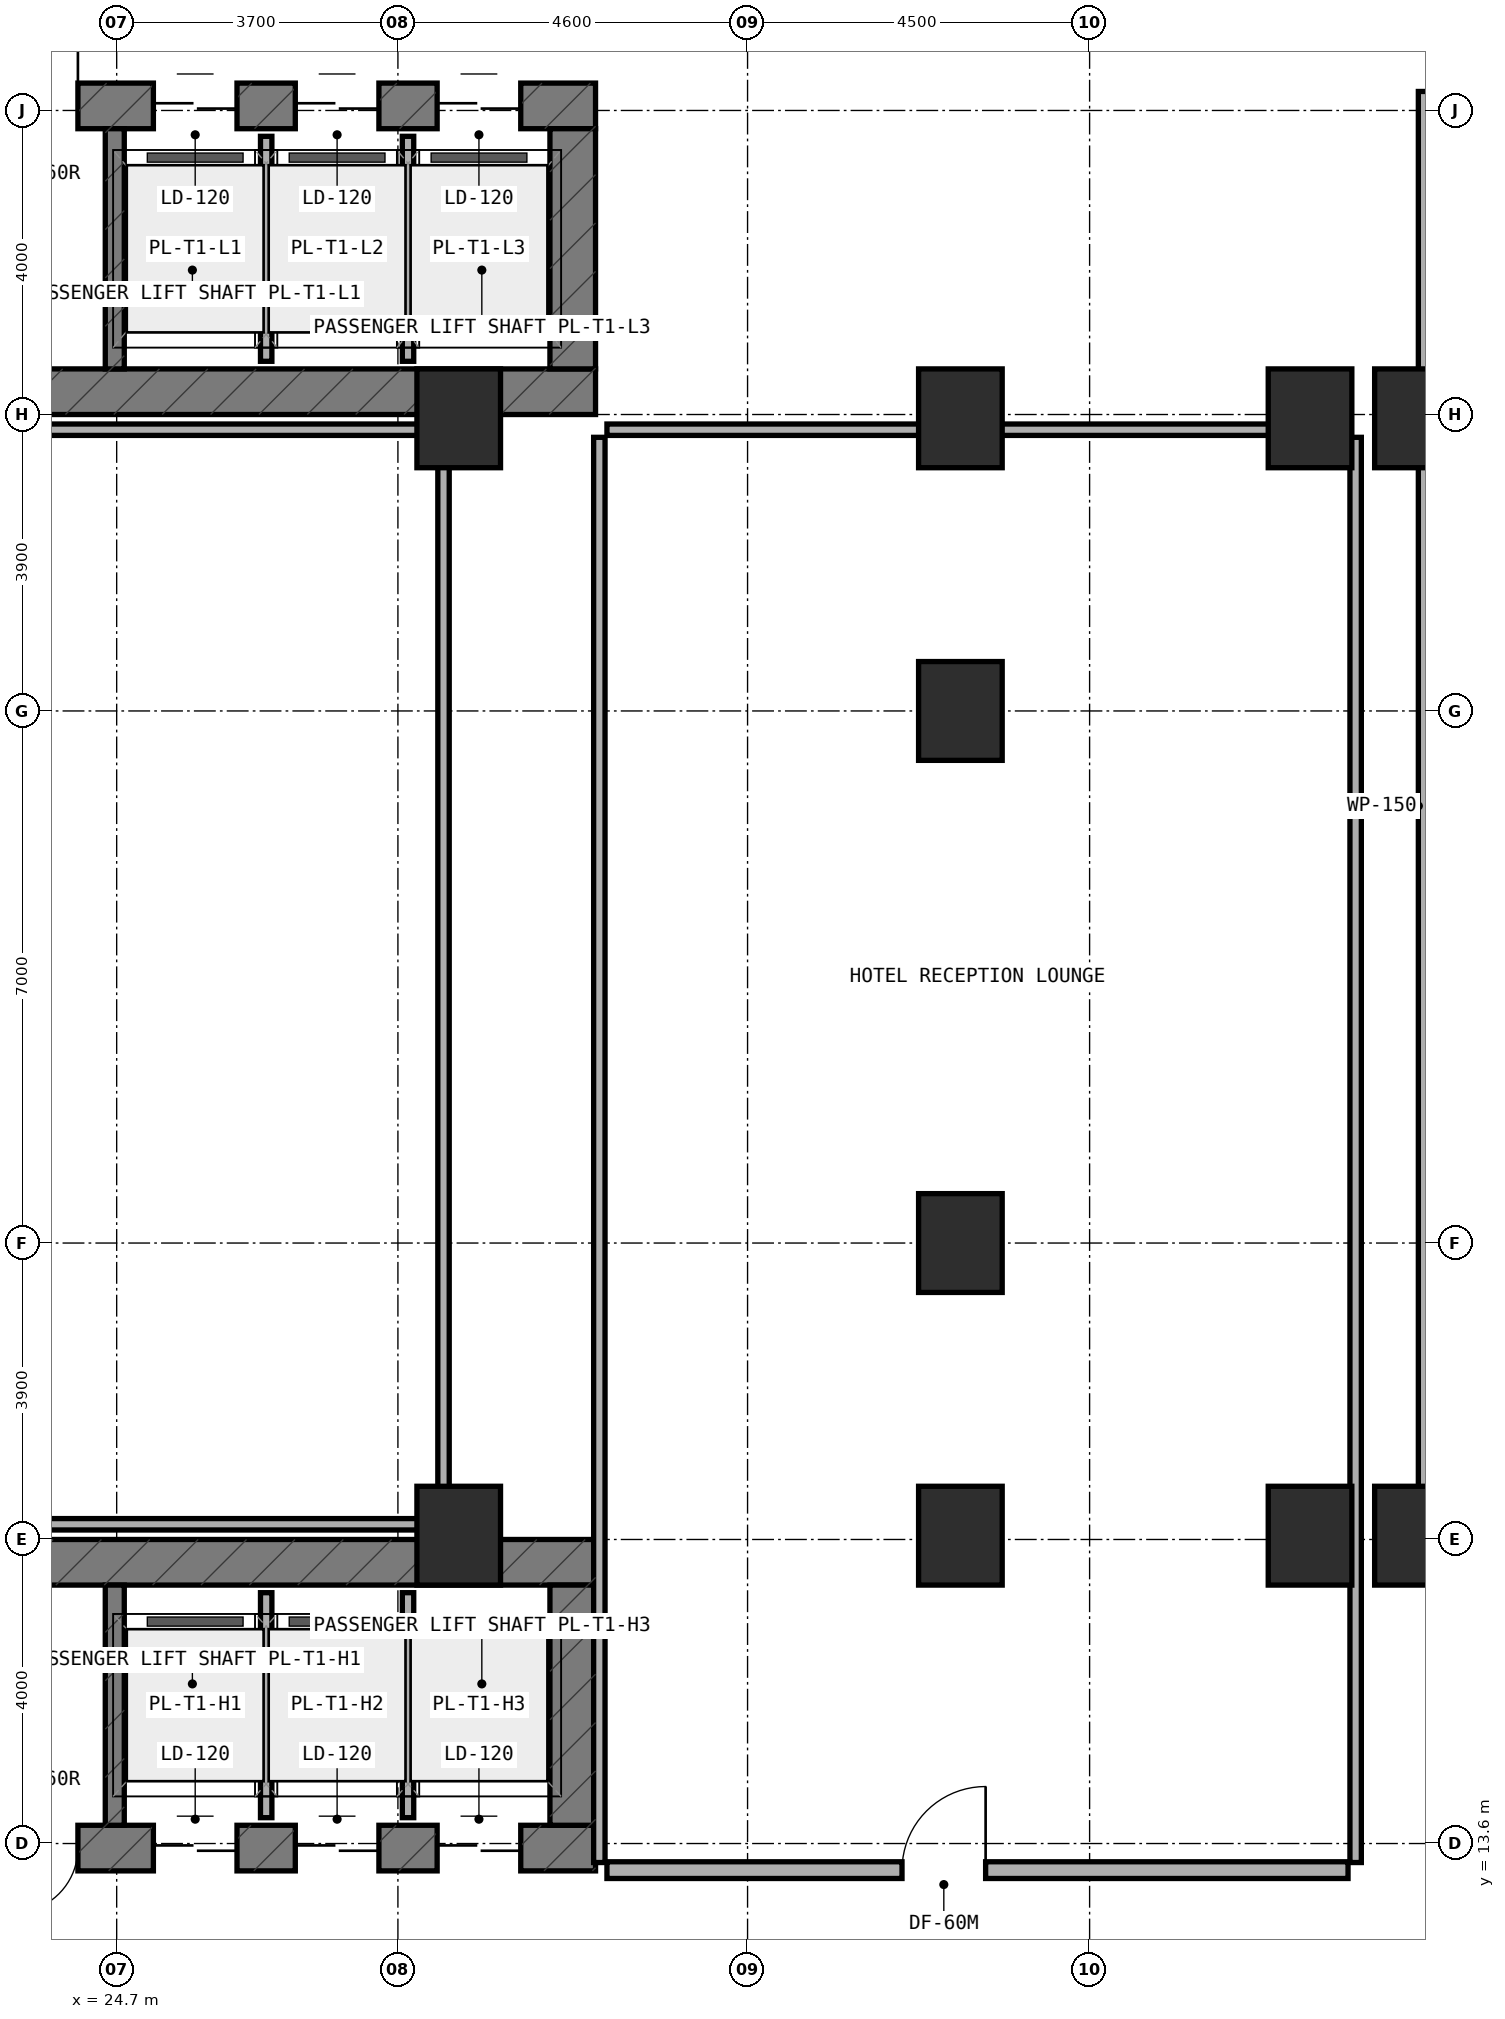
"""IFC4 building model, lengths in metres.
Left out: names, types, materials, properties, quantities, classifications, styles, units other than length and angle.
Written with IfcOpenShell. Run it as: python <this file> out.ifc"""

import sys

from ifc_helpers import new_model, si_unit, direction, frame, frame_2d, origin, origin_2d, place, context, subcontext, project, spatial, rectangle, extrude, element, fill, save


model = new_model("IFC4")
c1 = context("Model", 3, precision=1e-05, world=origin(), true_north=direction((0.0, 1.0)))
c2 = subcontext(c1, "Body", "Model", "MODEL_VIEW")
j1 = project(units=[si_unit("LENGTHUNIT", "METRE"), si_unit("PLANEANGLEUNIT", "RADIAN")], contexts=[c1])
p1 = place(None, origin())
s1 = spatial("IfcSite", under=j1, at=p1, CompositionType="ELEMENT")
p2 = place(p1, origin())
s2 = spatial("IfcBuilding", under=s1, at=p2, CompositionType="ELEMENT")
p3 = place(p2, origin())
s3 = spatial("IfcBuildingStorey", under=s2, at=p3, CompositionType="ELEMENT", Elevation=0.0)
p4 = place(p3, frame((6.2, 32.7, 0.0), z_axis=(0.0, 0.0, 1.0), x_axis=(1.0, 0.0, 0.0)))
e1 = element("IfcWall", 1, at=p4, inside=s3, PredefinedType="SHEAR", context=c2, shape_type="SweptSolid", body=[
    extrude(rectangle(XDim=24.8, YDim=0.6, at=frame_2d((12.4, 0.0))), origin(), (0.0, 0.0, 1.0), 5.4),
])
p5 = place(p3, frame((6.2, 36.46, 0.0), z_axis=(0.0, 0.0, 1.0), x_axis=(1.0, 0.0, 0.0)))
e2 = element("IfcWall", 2, at=p5, inside=s3, PredefinedType="SHEAR", context=c2, shape_type="SweptSolid", body=[
    extrude(rectangle(XDim=24.8, YDim=0.6, at=frame_2d((12.4, 0.0))), origin(), (0.0, 0.0, 1.0), 5.4),
])
p6 = place(p5, frame((9.35, 0.0, 0.0)))
e3 = element("IfcOpeningElement", 3, at=p6, cuts=e2, PredefinedType="OPENING", context=c2, shape_type="SweptSolid", body=[
    extrude(rectangle(XDim=1.2, YDim=2.15, at=frame_2d((0.6, 1.075))), frame((0.0, 0.31, 0.0), z_axis=(0.0, -1.0, 0.0), x_axis=(1.0, 0.0, 0.0)), (0.0, 0.0, 1.0), 0.62),
])
p7 = place(p5, frame((6.15, 0.0, 0.0)))
e4 = element("IfcOpeningElement", 4, at=p7, cuts=e2, PredefinedType="OPENING", context=c2, shape_type="SweptSolid", body=[
    extrude(rectangle(XDim=1.3, YDim=2.15, at=frame_2d((0.65, 1.075))), frame((0.0, 0.31, 0.0), z_axis=(0.0, -1.0, 0.0), x_axis=(1.0, 0.0, 0.0)), (0.0, 0.0, 1.0), 0.62),
])
p8 = place(p5, frame((17.14, 0.0, 0.0)))
e5 = element("IfcOpeningElement", 5, at=p8, cuts=e2, PredefinedType="OPENING", context=c2, shape_type="SweptSolid", body=[
    extrude(rectangle(XDim=0.85, YDim=2.1, at=frame_2d((0.425, 1.05))), frame((0.0, 0.31, 0.0), z_axis=(0.0, -1.0, 0.0), x_axis=(1.0, 0.0, 0.0)), (0.0, 0.0, 1.0), 0.62),
])
p9 = place(p5, frame((18.983, 0.0, 0.0)))
e6 = element("IfcOpeningElement", 6, at=p9, cuts=e2, PredefinedType="OPENING", context=c2, shape_type="SweptSolid", body=[
    extrude(rectangle(XDim=1.1, YDim=2.15, at=frame_2d((0.55, 1.075))), frame((0.0, 0.31, 0.0), z_axis=(0.0, -1.0, 0.0), x_axis=(1.0, 0.0, 0.0)), (0.0, 0.0, 1.0), 0.62),
])
p10 = place(p5, frame((20.85, 0.0, 0.0)))
e7 = element("IfcOpeningElement", 7, at=p10, cuts=e2, PredefinedType="OPENING", context=c2, shape_type="SweptSolid", body=[
    extrude(rectangle(XDim=1.1, YDim=2.15, at=frame_2d((0.55, 1.075))), frame((0.0, 0.31, 0.0), z_axis=(0.0, -1.0, 0.0), x_axis=(1.0, 0.0, 0.0)), (0.0, 0.0, 1.0), 0.62),
])
p11 = place(p5, frame((22.716, 0.0, 0.0)))
e8 = element("IfcOpeningElement", 8, at=p11, cuts=e2, PredefinedType="OPENING", context=c2, shape_type="SweptSolid", body=[
    extrude(rectangle(XDim=1.1, YDim=2.15, at=frame_2d((0.55, 1.075))), frame((0.0, 0.31, 0.0), z_axis=(0.0, -1.0, 0.0), x_axis=(1.0, 0.0, 0.0)), (0.0, 0.0, 1.0), 0.62),
])
p12 = place(p3, frame((30.7, 33.0, 0.0), z_axis=(0.0, 0.0, 1.0), x_axis=(0.0, 1.0, 0.0)))
e9 = element("IfcWall", 9, at=p12, inside=s3, PredefinedType="SHEAR", context=c2, shape_type="SweptSolid", body=[
    extrude(rectangle(XDim=3.16, YDim=0.6, at=frame_2d((1.58, 0.0))), origin(), (0.0, 0.0, 1.0), 5.4),
])
p13 = place(p3, frame((24.675, 33.0, 0.0), z_axis=(0.0, 0.0, 1.0), x_axis=(0.0, 1.0, 0.0)))
e10 = element("IfcWall", 10, at=p13, inside=s3, PredefinedType="STANDARD", context=c2, shape_type="SweptSolid", body=[
    extrude(rectangle(XDim=3.16, YDim=0.25, at=frame_2d((1.58, 0.0))), origin(), (0.0, 0.0, 1.0), 5.05),
])
p14 = place(p3, frame((6.2, 13.54, 0.0), z_axis=(0.0, 0.0, 1.0), x_axis=(1.0, 0.0, 0.0)))
e11 = element("IfcWall", 11, at=p14, inside=s3, PredefinedType="SHEAR", context=c2, shape_type="SweptSolid", body=[
    extrude(rectangle(XDim=24.8, YDim=0.6, at=frame_2d((12.4, 0.0))), origin(), (0.0, 0.0, 1.0), 5.4),
])
p15 = place(p14, frame((9.35, 0.0, 0.0)))
e12 = element("IfcOpeningElement", 12, at=p15, cuts=e11, PredefinedType="OPENING", context=c2, shape_type="SweptSolid", body=[
    extrude(rectangle(XDim=1.2, YDim=2.15, at=frame_2d((0.6, 1.075))), frame((0.0, 0.31, 0.0), z_axis=(0.0, -1.0, 0.0), x_axis=(1.0, 0.0, 0.0)), (0.0, 0.0, 1.0), 0.62),
])
p16 = place(p14, frame((6.15, 0.0, 0.0)))
e13 = element("IfcOpeningElement", 13, at=p16, cuts=e11, PredefinedType="OPENING", context=c2, shape_type="SweptSolid", body=[
    extrude(rectangle(XDim=1.3, YDim=2.15, at=frame_2d((0.65, 1.075))), frame((0.0, 0.31, 0.0), z_axis=(0.0, -1.0, 0.0), x_axis=(1.0, 0.0, 0.0)), (0.0, 0.0, 1.0), 0.62),
])
p17 = place(p14, frame((17.14, 0.0, 0.0)))
e14 = element("IfcOpeningElement", 14, at=p17, cuts=e11, PredefinedType="OPENING", context=c2, shape_type="SweptSolid", body=[
    extrude(rectangle(XDim=0.85, YDim=2.1, at=frame_2d((0.425, 1.05))), frame((0.0, 0.31, 0.0), z_axis=(0.0, -1.0, 0.0), x_axis=(1.0, 0.0, 0.0)), (0.0, 0.0, 1.0), 0.62),
])
p18 = place(p14, frame((18.983, 0.0, 0.0)))
e15 = element("IfcOpeningElement", 15, at=p18, cuts=e11, PredefinedType="OPENING", context=c2, shape_type="SweptSolid", body=[
    extrude(rectangle(XDim=1.1, YDim=2.15, at=frame_2d((0.55, 1.075))), frame((0.0, 0.31, 0.0), z_axis=(0.0, -1.0, 0.0), x_axis=(1.0, 0.0, 0.0)), (0.0, 0.0, 1.0), 0.62),
])
p19 = place(p14, frame((20.85, 0.0, 0.0)))
e16 = element("IfcOpeningElement", 16, at=p19, cuts=e11, PredefinedType="OPENING", context=c2, shape_type="SweptSolid", body=[
    extrude(rectangle(XDim=1.1, YDim=2.15, at=frame_2d((0.55, 1.075))), frame((0.0, 0.31, 0.0), z_axis=(0.0, -1.0, 0.0), x_axis=(1.0, 0.0, 0.0)), (0.0, 0.0, 1.0), 0.62),
])
p20 = place(p14, frame((22.716, 0.0, 0.0)))
e17 = element("IfcOpeningElement", 17, at=p20, cuts=e11, PredefinedType="OPENING", context=c2, shape_type="SweptSolid", body=[
    extrude(rectangle(XDim=1.1, YDim=2.15, at=frame_2d((0.55, 1.075))), frame((0.0, 0.31, 0.0), z_axis=(0.0, -1.0, 0.0), x_axis=(1.0, 0.0, 0.0)), (0.0, 0.0, 1.0), 0.62),
])
p21 = place(p3, frame((6.2, 17.3, 0.0), z_axis=(0.0, 0.0, 1.0), x_axis=(1.0, 0.0, 0.0)))
e18 = element("IfcWall", 18, at=p21, inside=s3, PredefinedType="SHEAR", context=c2, shape_type="SweptSolid", body=[
    extrude(rectangle(XDim=24.8, YDim=0.6, at=frame_2d((12.4, 0.0))), origin(), (0.0, 0.0, 1.0), 5.4),
])
p22 = place(p3, frame((30.7, 13.84, 0.0), z_axis=(0.0, 0.0, 1.0), x_axis=(0.0, 1.0, 0.0)))
e19 = element("IfcWall", 19, at=p22, inside=s3, PredefinedType="SHEAR", context=c2, shape_type="SweptSolid", body=[
    extrude(rectangle(XDim=3.16, YDim=0.6, at=frame_2d((1.58, 0.0))), origin(), (0.0, 0.0, 1.0), 5.4),
])
p23 = place(p3, frame((24.675, 13.84, 0.0), z_axis=(0.0, 0.0, 1.0), x_axis=(0.0, 1.0, 0.0)))
e20 = element("IfcWall", 20, at=p23, inside=s3, PredefinedType="STANDARD", context=c2, shape_type="SweptSolid", body=[
    extrude(rectangle(XDim=3.16, YDim=0.25, at=frame_2d((1.58, 0.0))), origin(), (0.0, 0.0, 1.0), 5.05),
])
for number, where, z_axis, x_axis in (
    (21, (35.8, 21.5, 0.0), (0.0, 0.0, 1.0), (1.0, 0.0, 0.0)),
    (22, (35.8, 28.5, 0.0), (0.0, 0.0, 1.0), (1.0, 0.0, 0.0)),
    (23, (35.8, 17.65, 0.0), (0.0, 0.0, 1.0), (1.0, 0.0, 0.0)),
    (24, (35.8, 32.35, 0.0), (0.0, 0.0, 1.0), (1.0, 0.0, 0.0)),
    (25, (29.2, 17.65, 0.0), (0.0, 0.0, 1.0), (1.0, 0.0, 0.0)),
    (26, (29.2, 32.35, 0.0), (0.0, 0.0, 1.0), (1.0, 0.0, 0.0)),
    (27, (40.4, 17.65, 0.0), (0.0, 0.0, 1.0), (1.0, 0.0, 0.0)),
    (28, (40.4, 32.35, 0.0), (0.0, 0.0, 1.0), (1.0, 0.0, 0.0)),
    (29, (41.8, 17.65, 0.0), (0.0, 0.0, 1.0), (1.0, 0.0, 0.0)),
    (30, (41.8, 32.35, 0.0), (0.0, 0.0, 1.0), (1.0, 0.0, 0.0)),
):
    element("IfcColumn", number, at=place(p3, frame(where, z_axis=z_axis, x_axis=x_axis)), inside=s3, PredefinedType="COLUMN", context=c2, shape_type="SweptSolid", body=[
        extrude(rectangle(XDim=1.1, YDim=1.3, at=origin_2d()), origin(), (0.0, 0.0, 1.0), 5.4),
    ])
p24 = place(p3, frame((26.667, 33.1, 0.0), z_axis=(0.0, 0.0, 1.0), x_axis=(0.0, 1.0, 0.0)))
e31 = element("IfcWall", 31, at=p24, inside=s3, PredefinedType="PARTITIONING", context=c2, shape_type="SweptSolid", body=[
    extrude(rectangle(XDim=2.96, YDim=0.15, at=frame_2d((1.48, 0.0))), origin(), (0.0, 0.0, 1.0), 5.05),
])
p25 = place(p3, frame((28.533, 33.1, 0.0), z_axis=(0.0, 0.0, 1.0), x_axis=(0.0, 1.0, 0.0)))
e32 = element("IfcWall", 32, at=p25, inside=s3, PredefinedType="PARTITIONING", context=c2, shape_type="SweptSolid", body=[
    extrude(rectangle(XDim=2.96, YDim=0.15, at=frame_2d((1.48, 0.0))), origin(), (0.0, 0.0, 1.0), 4.125),
])
p26 = place(p3, frame((26.667, 13.94, 0.0), z_axis=(0.0, 0.0, 1.0), x_axis=(0.0, 1.0, 0.0)))
e33 = element("IfcWall", 33, at=p26, inside=s3, PredefinedType="PARTITIONING", context=c2, shape_type="SweptSolid", body=[
    extrude(rectangle(XDim=2.96, YDim=0.15, at=frame_2d((1.48, 0.0))), origin(), (0.0, 0.0, 1.0), 5.05),
])
p27 = place(p3, frame((28.533, 13.94, 0.0), z_axis=(0.0, 0.0, 1.0), x_axis=(0.0, 1.0, 0.0)))
e34 = element("IfcWall", 34, at=p27, inside=s3, PredefinedType="PARTITIONING", context=c2, shape_type="SweptSolid", body=[
    extrude(rectangle(XDim=2.96, YDim=0.15, at=frame_2d((1.48, 0.0))), origin(), (0.0, 0.0, 1.0), 4.125),
])
p28 = place(p3, frame((29.0, 17.9, 0.0), z_axis=(0.0, 0.0, 1.0), x_axis=(0.0, 1.0, 0.0)))
e35 = element("IfcWall", 35, at=p28, inside=s3, PredefinedType="PARTITIONING", context=c2, shape_type="SweptSolid", body=[
    extrude(rectangle(XDim=14.2, YDim=0.15, at=frame_2d((7.1, 0.0))), origin(), (0.0, 0.0, 1.0), 4.025),
])
for number, where, z_axis, x_axis in (
    (36, (11.9, 17.8, 0.0), (0.0, 0.0, 1.0), (1.0, 0.0, 0.0)),
    (37, (11.9, 32.2, 0.0), (0.0, 0.0, 1.0), (1.0, 0.0, 0.0)),
):
    element("IfcWall", number, at=place(p3, frame(where, z_axis=z_axis, x_axis=x_axis)), inside=s3, PredefinedType="PARTITIONING", context=c2, shape_type="SweptSolid", body=[
        extrude(rectangle(XDim=17.0, YDim=0.15, at=frame_2d((8.5, 0.0))), origin(), (0.0, 0.0, 1.0), 5.05),
    ])
p29 = place(p3, frame((31.05, 13.35, 0.0), z_axis=(0.0, 0.0, 1.0), x_axis=(0.0, 1.0, 0.0)))
e38 = element("IfcWall", 38, at=p29, inside=s3, PredefinedType="PARTITIONING", context=c2, shape_type="SweptSolid", body=[
    extrude(rectangle(XDim=18.75, YDim=0.15, at=frame_2d((9.375, 0.0))), origin(), (0.0, 0.0, 1.0), 4.025),
])
p30 = place(p3, frame((41.0, 13.35, 0.0), z_axis=(0.0, 0.0, 1.0), x_axis=(0.0, 1.0, 0.0)))
e39 = element("IfcWall", 39, at=p30, inside=s3, PredefinedType="PARTITIONING", context=c2, shape_type="SweptSolid", body=[
    extrude(rectangle(XDim=18.75, YDim=0.15, at=frame_2d((9.375, 0.0))), origin(), (0.0, 0.0, 1.0), 4.525),
])
p31 = place(p3, frame((31.15, 32.2, 0.0), z_axis=(0.0, 0.0, 1.0), x_axis=(1.0, 0.0, 0.0)))
e40 = element("IfcWall", 40, at=p31, inside=s3, PredefinedType="PARTITIONING", context=c2, shape_type="SweptSolid", body=[
    extrude(rectangle(XDim=9.75, YDim=0.15, at=frame_2d((4.875, 0.0))), origin(), (0.0, 0.0, 1.0), 4.125),
])
p32 = place(p3, frame((31.15, 13.25, 0.0), z_axis=(0.0, 0.0, 1.0), x_axis=(1.0, 0.0, 0.0)))
e41 = element("IfcWall", 41, at=p32, inside=s3, PredefinedType="SOLIDWALL", context=c2, shape_type="SweptSolid", body=[
    extrude(rectangle(XDim=9.75, YDim=0.22, at=frame_2d((4.875, 0.0))), origin(), (0.0, 0.0, 1.0), 4.575),
])
p33 = place(p32, frame((3.882, 0.0, 0.0)))
e42 = element("IfcOpeningElement", 42, at=p33, cuts=e41, PredefinedType="OPENING", context=c2, shape_type="SweptSolid", body=[
    extrude(rectangle(XDim=1.1, YDim=2.1, at=frame_2d((0.55, 1.05))), frame((0.0, 0.12, 0.0), z_axis=(0.0, -1.0, 0.0), x_axis=(1.0, 0.0, 0.0)), (0.0, 0.0, 1.0), 0.24),
])
p34 = place(p3, frame((41.9, 17.85, 0.0), z_axis=(0.0, 0.0, 1.0), x_axis=(0.0, 1.0, 0.0)))
e43 = element("IfcWall", 43, at=p34, inside=s3, PredefinedType="PARTITIONING", context=c2, shape_type="SweptSolid", body=[
    extrude(rectangle(XDim=18.8, YDim=0.15, at=frame_2d((9.4, 0.0))), origin(), (0.0, 0.0, 1.0), 4.325),
])
p35 = place(p8, origin())
e44 = element("IfcDoor", 44, at=p35, inside=s3, OperationType="SINGLE_SWING_RIGHT", PredefinedType="DOOR", context=c2, shape_type="SweptSolid", body=[
    extrude(rectangle(XDim=0.85, YDim=2.1, at=frame_2d((0.425, 1.05))), frame((0.0, 0.025, 0.0), z_axis=(0.0, -1.0, 0.0), x_axis=(1.0, 0.0, 0.0)), (0.0, 0.0, 1.0), 0.05),
])
fill(e5, e44)
p36 = place(p9, origin())
e45 = element("IfcDoor", 45, at=p36, inside=s3, OperationType="DOUBLE_DOOR_SLIDING", PredefinedType="DOOR", context=c2, shape_type="SweptSolid", body=[
    extrude(rectangle(XDim=1.1, YDim=2.15, at=frame_2d((0.55, 1.075))), frame((0.0, 0.025, 0.0), z_axis=(0.0, -1.0, 0.0), x_axis=(1.0, 0.0, 0.0)), (0.0, 0.0, 1.0), 0.05),
])
fill(e6, e45)
p37 = place(p10, origin())
e46 = element("IfcDoor", 46, at=p37, inside=s3, OperationType="DOUBLE_DOOR_SLIDING", PredefinedType="DOOR", context=c2, shape_type="SweptSolid", body=[
    extrude(rectangle(XDim=1.1, YDim=2.15, at=frame_2d((0.55, 1.075))), frame((0.0, 0.025, 0.0), z_axis=(0.0, -1.0, 0.0), x_axis=(1.0, 0.0, 0.0)), (0.0, 0.0, 1.0), 0.05),
])
fill(e7, e46)
p38 = place(p11, origin())
e47 = element("IfcDoor", 47, at=p38, inside=s3, OperationType="DOUBLE_DOOR_SLIDING", PredefinedType="DOOR", context=c2, shape_type="SweptSolid", body=[
    extrude(rectangle(XDim=1.1, YDim=2.15, at=frame_2d((0.55, 1.075))), frame((0.0, 0.025, 0.0), z_axis=(0.0, -1.0, 0.0), x_axis=(1.0, 0.0, 0.0)), (0.0, 0.0, 1.0), 0.05),
])
fill(e8, e47)
p39 = place(p17, frame((0.85, 0.0, 0.0), z_axis=(0.0, 0.0, 1.0), x_axis=(-1.0, 0.0, 0.0)))
e48 = element("IfcDoor", 48, at=p39, inside=s3, OperationType="SINGLE_SWING_RIGHT", PredefinedType="DOOR", context=c2, shape_type="SweptSolid", body=[
    extrude(rectangle(XDim=0.85, YDim=2.1, at=frame_2d((0.425, 1.05))), frame((0.0, 0.025, 0.0), z_axis=(0.0, -1.0, 0.0), x_axis=(1.0, 0.0, 0.0)), (0.0, 0.0, 1.0), 0.05),
])
fill(e14, e48)
p40 = place(p18, frame((1.1, 0.0, 0.0), z_axis=(0.0, 0.0, 1.0), x_axis=(-1.0, 0.0, 0.0)))
e49 = element("IfcDoor", 49, at=p40, inside=s3, OperationType="DOUBLE_DOOR_SLIDING", PredefinedType="DOOR", context=c2, shape_type="SweptSolid", body=[
    extrude(rectangle(XDim=1.1, YDim=2.15, at=frame_2d((0.55, 1.075))), frame((0.0, 0.025, 0.0), z_axis=(0.0, -1.0, 0.0), x_axis=(1.0, 0.0, 0.0)), (0.0, 0.0, 1.0), 0.05),
])
fill(e15, e49)
p41 = place(p19, frame((1.1, 0.0, 0.0), z_axis=(0.0, 0.0, 1.0), x_axis=(-1.0, 0.0, 0.0)))
e50 = element("IfcDoor", 50, at=p41, inside=s3, OperationType="DOUBLE_DOOR_SLIDING", PredefinedType="DOOR", context=c2, shape_type="SweptSolid", body=[
    extrude(rectangle(XDim=1.1, YDim=2.15, at=frame_2d((0.55, 1.075))), frame((0.0, 0.025, 0.0), z_axis=(0.0, -1.0, 0.0), x_axis=(1.0, 0.0, 0.0)), (0.0, 0.0, 1.0), 0.05),
])
fill(e16, e50)
p42 = place(p20, frame((1.1, 0.0, 0.0), z_axis=(0.0, 0.0, 1.0), x_axis=(-1.0, 0.0, 0.0)))
e51 = element("IfcDoor", 51, at=p42, inside=s3, OperationType="DOUBLE_DOOR_SLIDING", PredefinedType="DOOR", context=c2, shape_type="SweptSolid", body=[
    extrude(rectangle(XDim=1.1, YDim=2.15, at=frame_2d((0.55, 1.075))), frame((0.0, 0.025, 0.0), z_axis=(0.0, -1.0, 0.0), x_axis=(1.0, 0.0, 0.0)), (0.0, 0.0, 1.0), 0.05),
])
fill(e17, e51)
p43 = place(p33, origin())
e52 = element("IfcDoor", 52, at=p43, inside=s3, OperationType="SINGLE_SWING_RIGHT", PredefinedType="DOOR", context=c2, shape_type="SweptSolid", body=[
    extrude(rectangle(XDim=1.1, YDim=2.1, at=frame_2d((0.55, 1.05))), frame((0.0, 0.025, 0.0), z_axis=(0.0, -1.0, 0.0), x_axis=(1.0, 0.0, 0.0)), (0.0, 0.0, 1.0), 0.05),
])
fill(e42, e52)
save(model, sys.argv[1])
